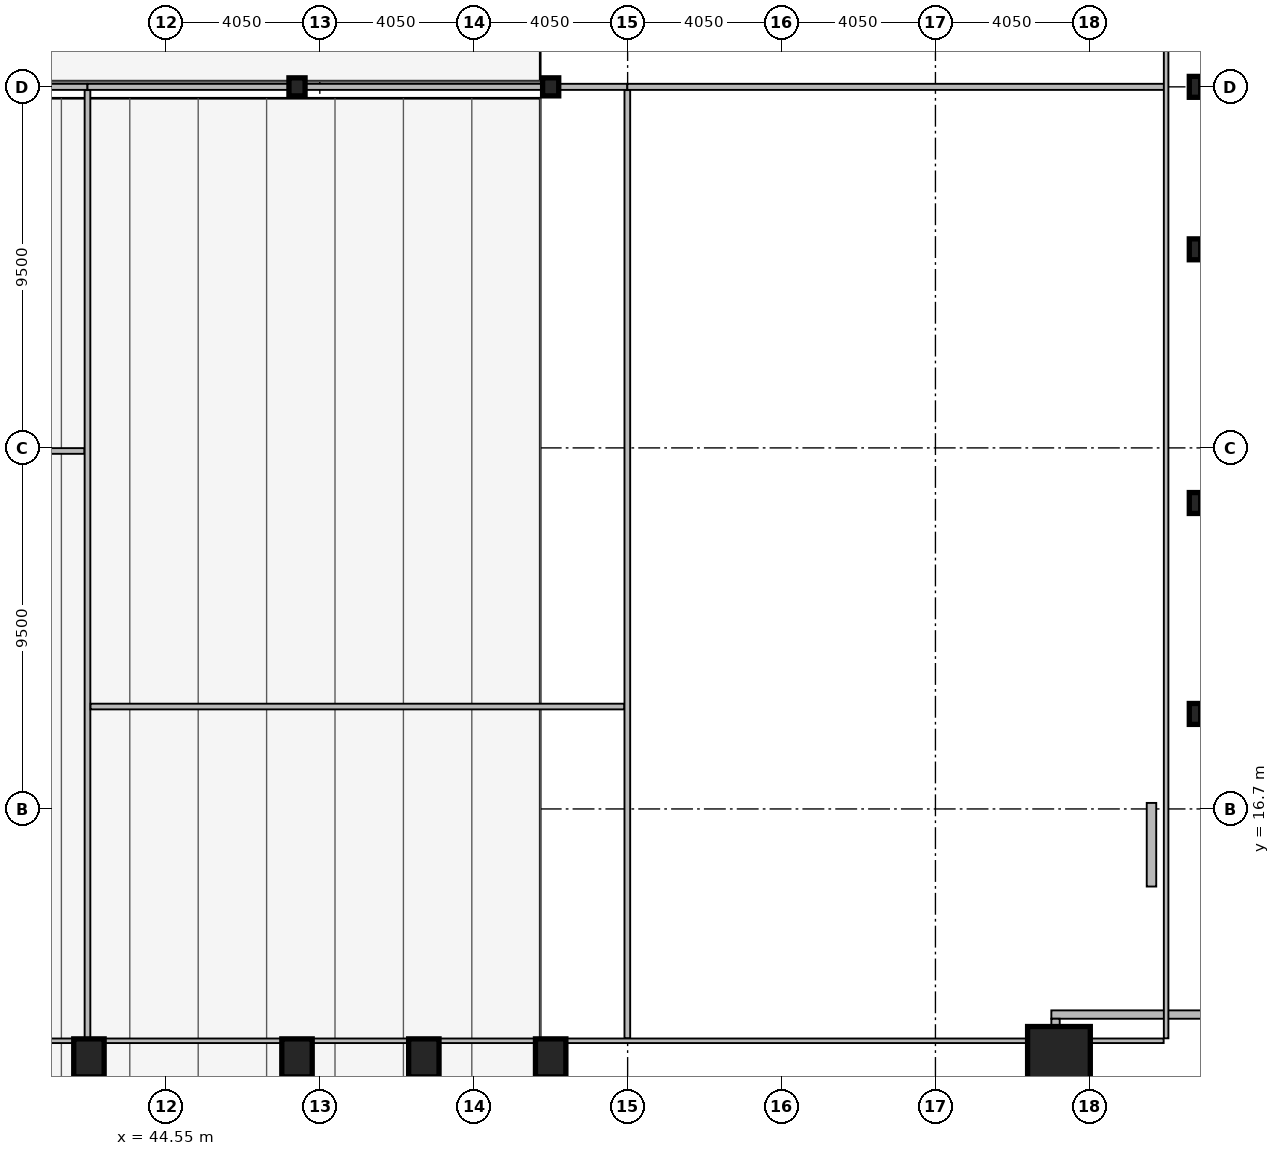
"""IFC4 building model, lengths in metres.
Left out: names, types, materials, properties, quantities, classifications, styles, units other than length and angle.
Written with IfcOpenShell. Run it as: python <this file> out.ifc"""

import sys

from ifc_helpers import new_model, si_unit, direction, frame, frame_2d, origin, origin_2d, place, context, subcontext, project, spatial, rectangle, hollow_rectangle, i_section, extrude, element, fill, save


model = new_model("IFC4")
c1 = context("Model", 3, precision=1e-05, world=origin(), true_north=direction((0.0, 1.0)))
c2 = subcontext(c1, "Body", "Model", "MODEL_VIEW")
j1 = project(units=[si_unit("LENGTHUNIT", "METRE"), si_unit("PLANEANGLEUNIT", "RADIAN")], contexts=[c1])
p1 = place(None, origin())
s1 = spatial("IfcSite", under=j1, at=p1, CompositionType="ELEMENT")
p2 = place(p1, origin())
s2 = spatial("IfcBuilding", under=s1, at=p2, CompositionType="ELEMENT")
p3 = place(p2, frame((0.0, 0.0, 25.8)))
s3 = spatial("IfcBuildingStorey", under=s2, at=p3, CompositionType="ELEMENT", Elevation=25.8)
p4 = place(p3, frame((68.05, 10.15, 0.0), z_axis=(0.0, 0.0, 1.0), x_axis=(1.0, 0.0, 0.0)))
e1 = element("IfcColumn", 1, at=p4, inside=s3, PredefinedType="COLUMN", context=c2, shape_type="SweptSolid", body=[
    extrude(hollow_rectangle(XDim=1.65, YDim=1.65, WallThickness=0.075, at=origin_2d()), origin(), (0.0, 0.0, 1.0), 4.0),
])
for number, where, z_axis, x_axis in (
    (2, (42.525, 10.15, 0.0), (0.0, 0.0, 1.0), (1.0, 0.0, 0.0)),
    (3, (48.0, 10.15, 0.0), (0.0, 0.0, 1.0), (1.0, 0.0, 0.0)),
    (4, (51.337, 10.15, 0.0), (0.0, 0.0, 1.0), (1.0, 0.0, 0.0)),
    (5, (54.675, 10.15, 0.0), (0.0, 0.0, 1.0), (1.0, 0.0, 0.0)),
):
    element("IfcColumn", number, at=place(p3, frame(where, z_axis=z_axis, x_axis=x_axis)), inside=s3, PredefinedType="COLUMN", context=c2, shape_type="SweptSolid", body=[
        extrude(hollow_rectangle(XDim=0.8, YDim=1.0, WallThickness=0.055, at=origin_2d()), origin(), (0.0, 0.0, 1.0), 4.0),
    ])
for number, where, z_axis, x_axis in (
    (6, (71.63, 19.2, 0.0), (0.0, 0.0, 1.0), (1.0, 0.0, 0.0)),
    (7, (71.63, 24.75, 0.0), (0.0, 0.0, 1.0), (1.0, 0.0, 0.0)),
    (8, (71.63, 31.425, 0.0), (0.0, 0.0, 1.0), (1.0, 0.0, 0.0)),
    (9, (71.63, 35.7, 0.0), (0.0, 0.0, 1.0), (1.0, 0.0, 0.0)),
):
    element("IfcColumn", number, at=place(p3, frame(where, z_axis=z_axis, x_axis=x_axis)), inside=s3, PredefinedType="COLUMN", context=c2, shape_type="SweptSolid", body=[
        extrude(i_section(OverallWidth=0.3, OverallDepth=0.55, WebThickness=0.015, FlangeThickness=0.029, at=origin_2d()), origin(), (0.0, 0.0, 1.0), 4.0),
    ])
for number, where, z_axis, x_axis in (
    (10, (48.0, 35.7, 0.0), (0.0, 0.0, 1.0), (1.0, 0.0, 0.0)),
    (11, (54.675, 35.7, 0.0), (0.0, 0.0, 1.0), (1.0, 0.0, 0.0)),
):
    element("IfcColumn", number, at=place(p3, frame(where, z_axis=z_axis, x_axis=x_axis)), inside=s3, PredefinedType="COLUMN", context=c2, shape_type="SweptSolid", body=[
        extrude(i_section(OverallWidth=0.424, OverallDepth=0.474, WebThickness=0.048, FlangeThickness=0.077, at=origin_2d()), origin(), (0.0, 0.0, 1.0), 4.0),
    ])
p5 = place(p3, frame((72.07, 11.29, 0.0), z_axis=(0.0, 0.0, 1.0), x_axis=(-1.0, 0.0, 0.0)))
e12 = element("IfcWall", 12, at=p5, inside=s3, PredefinedType="SOLIDWALL", context=c2, shape_type="SweptSolid", body=[
    extrude(rectangle(XDim=4.22, YDim=0.22, at=frame_2d((2.11, 0.0))), origin(), (0.0, 0.0, 1.0), 3.16),
])
p6 = place(p3, frame((67.96, 11.18, 0.0), z_axis=(0.0, 0.0, 1.0), x_axis=(0.0, -1.0, 0.0)))
e13 = element("IfcWall", 13, at=p6, inside=s3, PredefinedType="SOLIDWALL", context=c2, shape_type="SweptSolid", body=[
    extrude(rectangle(XDim=3.91, YDim=0.22, at=frame_2d((1.955, 0.0))), origin(), (0.0, 0.0, 1.0), 3.16),
])
p7 = place(p3, frame((70.485, 14.658, 0.0), z_axis=(0.0, 0.0, 1.0), x_axis=(0.0, 1.0, 0.0)))
e14 = element("IfcWall", 14, at=p7, inside=s3, PredefinedType="PARAPET", context=c2, shape_type="SweptSolid", body=[
    extrude(rectangle(XDim=2.2, YDim=0.25, at=frame_2d((1.1, 0.0))), origin(), (0.0, 0.0, 1.0), 0.88),
])
p8 = place(p7, frame((0.4, 0.0, 0.16)))
e15 = element("IfcOpeningElement", 15, at=p8, cuts=e14, PredefinedType="OPENING", context=c2, shape_type="SweptSolid", body=[
    extrude(rectangle(XDim=1.4, YDim=0.5, at=frame_2d((0.7, 0.25))), frame((0.0, 0.135, 0.0), z_axis=(0.0, -1.0, 0.0), x_axis=(1.0, 0.0, 0.0)), (0.0, 0.0, 1.0), 0.27),
])
p9 = place(p3, frame((23.103, 35.7, 0.0), z_axis=(0.0, 0.0, 1.0), x_axis=(1.0, 0.0, 0.0)))
e16 = element("IfcWall", 16, at=p9, inside=s3, PredefinedType="PARTITIONING", context=c2, shape_type="SweptSolid", body=[
    extrude(rectangle(XDim=19.384, YDim=0.16, at=frame_2d((9.692, 0.0))), origin(), (0.0, 0.0, 1.0), 3.01),
])
p10 = place(p9, frame((8.141, 0.0, 0.0)))
e17 = element("IfcOpeningElement", 17, at=p10, cuts=e16, PredefinedType="OPENING", context=c2, shape_type="SweptSolid", body=[
    extrude(rectangle(XDim=1.6, YDim=2.15, at=frame_2d((0.8, 1.075))), frame((0.0, 0.09, 0.0), z_axis=(0.0, -1.0, 0.0), x_axis=(1.0, 0.0, 0.0)), (0.0, 0.0, 1.0), 0.18),
])
p11 = place(p3, frame((23.183, 26.119, 0.0), z_axis=(0.0, 0.0, 1.0), x_axis=(1.0, 0.0, 0.0)))
e18 = element("IfcWall", 18, at=p11, inside=s3, PredefinedType="PARTITIONING", context=c2, shape_type="SweptSolid", body=[
    extrude(rectangle(XDim=19.224, YDim=0.15, at=frame_2d((9.612, 0.0))), origin(), (0.0, 0.0, 1.0), 3.01),
])
p12 = place(p11, frame((8.723, 0.0, 0.0)))
e19 = element("IfcOpeningElement", 19, at=p12, cuts=e18, PredefinedType="OPENING", context=c2, shape_type="SweptSolid", body=[
    extrude(rectangle(XDim=0.9, YDim=2.05, at=frame_2d((0.45, 1.025))), frame((0.0, 0.085, 0.0), z_axis=(0.0, -1.0, 0.0), x_axis=(1.0, 0.0, 0.0)), (0.0, 0.0, 1.0), 0.17),
])
p13 = place(p3, frame((42.487, 35.7, 0.0), z_axis=(0.0, 0.0, 1.0), x_axis=(1.0, 0.0, 0.0)))
e20 = element("IfcWall", 20, at=p13, inside=s3, PredefinedType="PARTITIONING", context=c2, shape_type="SweptSolid", body=[
    extrude(rectangle(XDim=14.205, YDim=0.16, at=frame_2d((7.103, 0.0))), origin(), (0.0, 0.0, 1.0), 3.01),
])
p14 = place(p13, frame((6.216, 0.0, 0.0)))
e21 = element("IfcOpeningElement", 21, at=p14, cuts=e20, PredefinedType="OPENING", context=c2, shape_type="SweptSolid", body=[
    extrude(rectangle(XDim=1.6, YDim=2.15, at=frame_2d((0.8, 1.075))), frame((0.0, 0.09, 0.0), z_axis=(0.0, -1.0, 0.0), x_axis=(1.0, 0.0, 0.0)), (0.0, 0.0, 1.0), 0.18),
])
p15 = place(p3, frame((42.487, 10.665, 0.0), z_axis=(0.0, 0.0, 1.0), x_axis=(0.0, 1.0, 0.0)))
e22 = element("IfcWall", 22, at=p15, inside=s3, PredefinedType="PARTITIONING", context=c2, shape_type="SweptSolid", body=[
    extrude(rectangle(XDim=24.95, YDim=0.15, at=frame_2d((12.475, 0.0))), origin(), (0.0, 0.0, 1.0), 3.01),
])
p16 = place(p3, frame((42.567, 19.395, 0.0), z_axis=(0.0, 0.0, 1.0), x_axis=(1.0, 0.0, 0.0)))
e23 = element("IfcWall", 23, at=p16, inside=s3, PredefinedType="PARTITIONING", context=c2, shape_type="SweptSolid", body=[
    extrude(rectangle(XDim=14.046, YDim=0.15, at=frame_2d((7.023, 0.0))), origin(), (0.0, 0.0, 1.0), 3.01),
])
p17 = place(p16, frame((6.393, 0.0, 0.0)))
e24 = element("IfcOpeningElement", 24, at=p17, cuts=e23, PredefinedType="OPENING", context=c2, shape_type="SweptSolid", body=[
    extrude(rectangle(XDim=0.9, YDim=2.05, at=frame_2d((0.45, 1.025))), frame((0.0, 0.085, 0.0), z_axis=(0.0, -1.0, 0.0), x_axis=(1.0, 0.0, 0.0)), (0.0, 0.0, 1.0), 0.17),
])
p18 = place(p3, frame((56.692, 35.7, 0.0), z_axis=(0.0, 0.0, 1.0), x_axis=(1.0, 0.0, 0.0)))
e25 = element("IfcWall", 25, at=p18, inside=s3, PredefinedType="PARTITIONING", context=c2, shape_type="SweptSolid", body=[
    extrude(rectangle(XDim=14.178, YDim=0.16, at=frame_2d((7.089, 0.0))), origin(), (0.0, 0.0, 1.0), 3.01),
])
p19 = place(p18, frame((5.955, 0.0, 0.0)))
e26 = element("IfcOpeningElement", 26, at=p19, cuts=e25, PredefinedType="OPENING", context=c2, shape_type="SweptSolid", body=[
    extrude(rectangle(XDim=1.6, YDim=2.15, at=frame_2d((0.8, 1.075))), frame((0.0, 0.09, 0.0), z_axis=(0.0, -1.0, 0.0), x_axis=(1.0, 0.0, 0.0)), (0.0, 0.0, 1.0), 0.18),
])
p20 = place(p3, frame((56.692, 10.665, 0.0), z_axis=(0.0, 0.0, 1.0), x_axis=(0.0, 1.0, 0.0)))
e27 = element("IfcWall", 27, at=p20, inside=s3, PredefinedType="PARTITIONING", context=c2, shape_type="SweptSolid", body=[
    extrude(rectangle(XDim=24.95, YDim=0.15, at=frame_2d((12.475, 0.0))), origin(), (0.0, 0.0, 1.0), 3.01),
])
p21 = place(p3, frame((70.87, 10.665, 0.0), z_axis=(0.0, 0.0, 1.0), x_axis=(0.0, 1.0, 0.0)))
e28 = element("IfcWall", 28, at=p21, inside=s3, PredefinedType="PARTITIONING", context=c2, shape_type="SweptSolid", body=[
    extrude(rectangle(XDim=42.11, YDim=0.12, at=frame_2d((21.055, 0.0))), origin(), (0.0, 0.0, 1.0), 3.01),
])
p22 = place(p3, frame((2.095, 10.6, 0.0), z_axis=(0.0, 0.0, 1.0), x_axis=(1.0, 0.0, 0.0)))
e29 = element("IfcWall", 29, at=p22, inside=s3, PredefinedType="PARTITIONING", context=c2, shape_type="SweptSolid", body=[
    extrude(rectangle(XDim=68.71, YDim=0.12, at=frame_2d((34.355, 0.0))), origin(), (0.0, 0.0, 1.0), 3.01),
])
p23 = place(p8, origin())
e30 = element("IfcWindow", 30, at=p23, inside=s3, PartitioningType="SINGLE_PANEL", PredefinedType="SKYLIGHT", context=c2, shape_type="SweptSolid", body=[
    extrude(rectangle(XDim=1.4, YDim=0.5, at=frame_2d((0.7, 0.25))), frame((0.0, 0.03, 0.0), z_axis=(0.0, -1.0, 0.0), x_axis=(1.0, 0.0, 0.0)), (0.0, 0.0, 1.0), 0.06),
])
fill(e15, e30)
p24 = place(p14, origin())
e31 = element("IfcDoor", 31, at=p24, inside=s3, OperationType="DOUBLE_DOOR_SINGLE_SWING", PredefinedType="DOOR", context=c2, shape_type="SweptSolid", body=[
    extrude(rectangle(XDim=1.6, YDim=2.15, at=frame_2d((0.8, 1.075))), frame((0.0, 0.025, 0.0), z_axis=(0.0, -1.0, 0.0), x_axis=(1.0, 0.0, 0.0)), (0.0, 0.0, 1.0), 0.05),
])
fill(e21, e31)
p25 = place(p17, origin())
e32 = element("IfcDoor", 32, at=p25, inside=s3, OperationType="SINGLE_SWING_RIGHT", PredefinedType="DOOR", context=c2, shape_type="SweptSolid", body=[
    extrude(rectangle(XDim=0.9, YDim=2.05, at=frame_2d((0.45, 1.025))), frame((0.0, 0.025, 0.0), z_axis=(0.0, -1.0, 0.0), x_axis=(1.0, 0.0, 0.0)), (0.0, 0.0, 1.0), 0.05),
])
fill(e24, e32)
p26 = place(p19, origin())
e33 = element("IfcDoor", 33, at=p26, inside=s3, OperationType="DOUBLE_DOOR_SINGLE_SWING", PredefinedType="DOOR", context=c2, shape_type="SweptSolid", body=[
    extrude(rectangle(XDim=1.6, YDim=2.15, at=frame_2d((0.8, 1.075))), frame((0.0, 0.025, 0.0), z_axis=(0.0, -1.0, 0.0), x_axis=(1.0, 0.0, 0.0)), (0.0, 0.0, 1.0), 0.05),
])
fill(e26, e33)
save(model, sys.argv[1])
